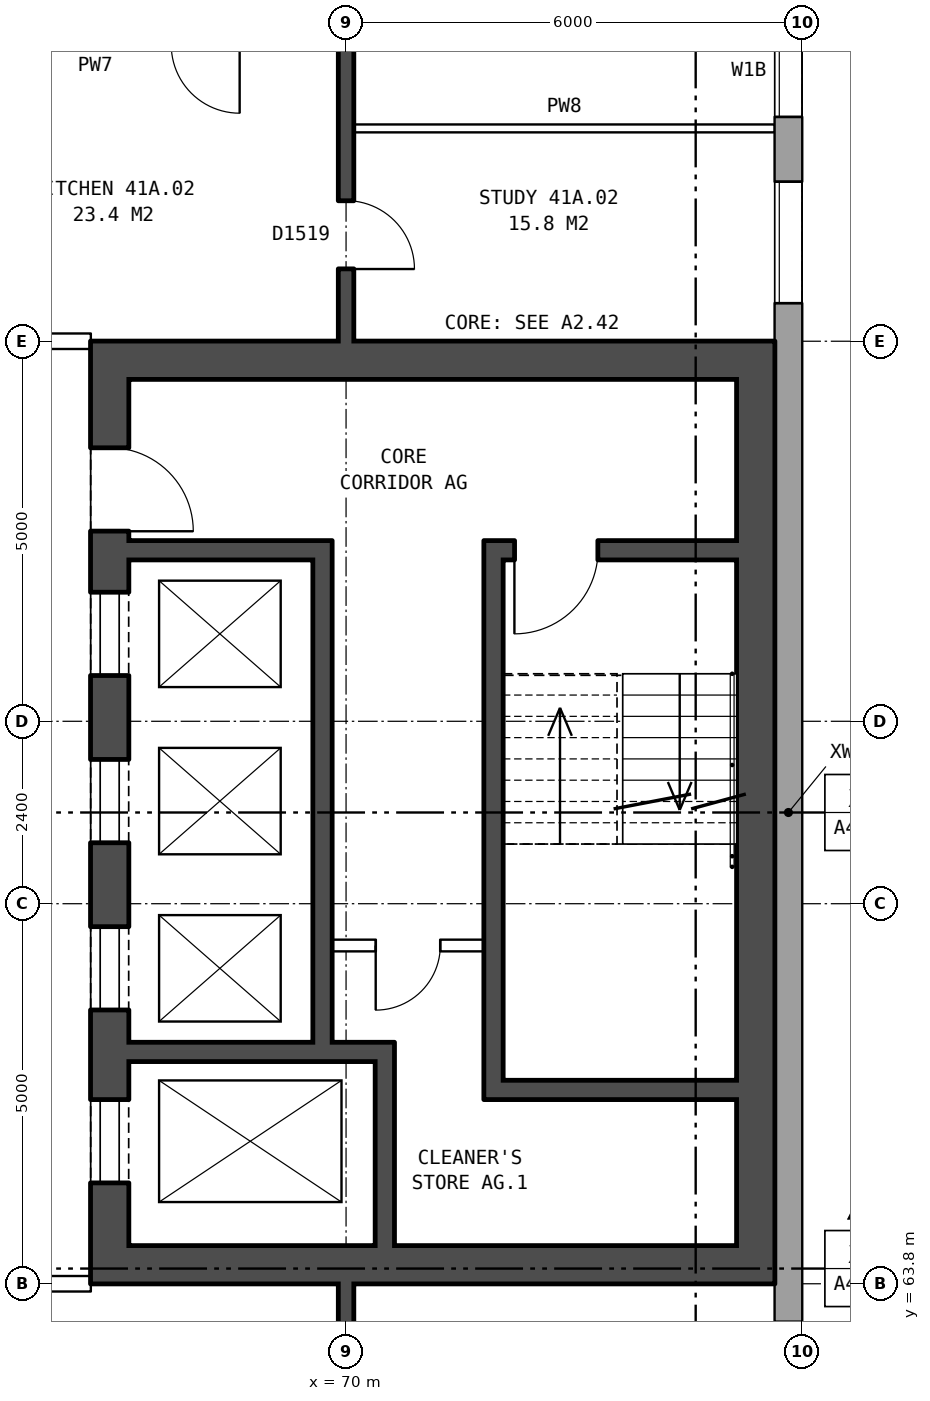
"""IFC4 building model, lengths in metres.
Left out: names, types, materials, properties, quantities, classifications, styles, units other than length and angle.
Written with IfcOpenShell. Run it as: python <this file> out.ifc"""

import sys

from ifc_helpers import new_model, si_unit, direction, frame, frame_2d, origin, place, context, subcontext, project, spatial, rectangle, extrude, element, fill, save


model = new_model("IFC4")
c1 = context("Model", 3, precision=1e-05, world=origin(), true_north=direction((0.0, 1.0)))
c2 = subcontext(c1, "Body", "Model", "MODEL_VIEW")
j1 = project(units=[si_unit("LENGTHUNIT", "METRE"), si_unit("PLANEANGLEUNIT", "RADIAN")], contexts=[c1])
p1 = place(None, origin())
s1 = spatial("IfcSite", under=j1, at=p1, CompositionType="ELEMENT")
p2 = place(p1, origin())
s2 = spatial("IfcBuilding", under=s1, at=p2, CompositionType="ELEMENT")
p3 = place(p2, frame((0.0, 0.0, 148.5)))
s3 = spatial("IfcBuildingStorey", under=s2, at=p3, CompositionType="ELEMENT", Elevation=148.5)
p4 = place(p3, frame((75.82, 57.075, 0.0), z_axis=(0.0, 0.0, 1.0), x_axis=(0.0, 1.0, 0.0)))
e1 = element("IfcWall", 1, at=p4, inside=s3, PredefinedType="STANDARD", context=c2, shape_type="SweptSolid", body=[
    extrude(rectangle(XDim=25.851, YDim=0.36, at=frame_2d((12.925, 0.0))), origin(), (0.0, 0.0, 1.0), 2.85),
])
p5 = place(p4, frame((1.375, 0.0, 0.8)))
e2 = element("IfcOpeningElement", 2, at=p5, cuts=e1, PredefinedType="OPENING", context=c2, shape_type="SweptSolid", body=[
    extrude(rectangle(XDim=1.0, YDim=1.2, at=frame_2d((0.5, 0.6))), frame((0.0, 0.19, 0.0), z_axis=(0.0, -1.0, 0.0), x_axis=(1.0, 0.0, 0.0)), (0.0, 0.0, 1.0), 0.38),
])
p6 = place(p4, frame((4.625, 0.0, 0.8)))
e3 = element("IfcOpeningElement", 3, at=p6, cuts=e1, PredefinedType="OPENING", context=c2, shape_type="SweptSolid", body=[
    extrude(rectangle(XDim=1.6, YDim=1.8, at=frame_2d((0.8, 0.9))), frame((0.0, 0.19, 0.0), z_axis=(0.0, -1.0, 0.0), x_axis=(1.0, 0.0, 0.0)), (0.0, 0.0, 1.0), 0.38),
])
p7 = place(p4, frame((19.625, 0.0, 0.8)))
e4 = element("IfcOpeningElement", 4, at=p7, cuts=e1, PredefinedType="OPENING", context=c2, shape_type="SweptSolid", body=[
    extrude(rectangle(XDim=1.6, YDim=1.8, at=frame_2d((0.8, 0.9))), frame((0.0, 0.19, 0.0), z_axis=(0.0, -1.0, 0.0), x_axis=(1.0, 0.0, 0.0)), (0.0, 0.0, 1.0), 0.38),
])
p8 = place(p4, frame((22.075, 0.0, 0.8)))
e5 = element("IfcOpeningElement", 5, at=p8, cuts=e1, PredefinedType="OPENING", context=c2, shape_type="SweptSolid", body=[
    extrude(rectangle(XDim=1.2, YDim=1.8, at=frame_2d((0.6, 0.9))), frame((0.0, 0.19, 0.0), z_axis=(0.0, -1.0, 0.0), x_axis=(1.0, 0.0, 0.0)), (0.0, 0.0, 1.0), 0.38),
])
p9 = place(p4, frame((2.675, 0.0, 0.8)))
e6 = element("IfcOpeningElement", 6, at=p9, cuts=e1, PredefinedType="OPENING", context=c2, shape_type="SweptSolid", body=[
    extrude(rectangle(XDim=1.4, YDim=1.8, at=frame_2d((0.7, 0.9))), frame((0.0, 0.19, 0.0), z_axis=(0.0, -1.0, 0.0), x_axis=(1.0, 0.0, 0.0)), (0.0, 0.0, 1.0), 0.38),
])
p10 = place(p4, frame((23.575, 0.0, 0.8)))
e7 = element("IfcOpeningElement", 7, at=p10, cuts=e1, PredefinedType="OPENING", context=c2, shape_type="SweptSolid", body=[
    extrude(rectangle(XDim=1.4, YDim=0.9, at=frame_2d((0.7, 0.45))), frame((0.0, 0.19, 0.0), z_axis=(0.0, -1.0, 0.0), x_axis=(1.0, 0.0, 0.0)), (0.0, 0.0, 1.0), 0.38),
])
p11 = place(p3, frame((66.89, 63.8, 0.0), z_axis=(0.0, 0.0, 1.0), x_axis=(0.0, 1.0, 0.0)))
e8 = element("IfcWall", 8, at=p11, inside=s3, PredefinedType="SHEAR", context=c2, shape_type="SweptSolid", body=[
    extrude(rectangle(XDim=12.4, YDim=0.5, at=frame_2d((6.2, 0.0))), origin(), (0.0, 0.0, 1.0), 2.85),
])
p12 = place(p11, frame((1.325, 0.0, 0.0)))
e9 = element("IfcOpeningElement", 9, at=p12, cuts=e8, PredefinedType="OPENING", context=c2, shape_type="SweptSolid", body=[
    extrude(rectangle(XDim=1.1, YDim=2.1, at=frame_2d((0.55, 1.05))), frame((0.0, 0.26, 0.0), z_axis=(0.0, -1.0, 0.0), x_axis=(1.0, 0.0, 0.0)), (0.0, 0.0, 1.0), 0.52),
])
p13 = place(p11, frame((3.6, 0.0, 0.0)))
e10 = element("IfcOpeningElement", 10, at=p13, cuts=e8, PredefinedType="OPENING", context=c2, shape_type="SweptSolid", body=[
    extrude(rectangle(XDim=1.1, YDim=2.1, at=frame_2d((0.55, 1.05))), frame((0.0, 0.26, 0.0), z_axis=(0.0, -1.0, 0.0), x_axis=(1.0, 0.0, 0.0)), (0.0, 0.0, 1.0), 0.52),
])
p14 = place(p11, frame((5.8, 0.0, 0.0)))
e11 = element("IfcOpeningElement", 11, at=p14, cuts=e8, PredefinedType="OPENING", context=c2, shape_type="SweptSolid", body=[
    extrude(rectangle(XDim=1.1, YDim=2.1, at=frame_2d((0.55, 1.05))), frame((0.0, 0.26, 0.0), z_axis=(0.0, -1.0, 0.0), x_axis=(1.0, 0.0, 0.0)), (0.0, 0.0, 1.0), 0.52),
])
p15 = place(p11, frame((8.0, 0.0, 0.0)))
e12 = element("IfcOpeningElement", 12, at=p15, cuts=e8, PredefinedType="OPENING", context=c2, shape_type="SweptSolid", body=[
    extrude(rectangle(XDim=1.1, YDim=2.1, at=frame_2d((0.55, 1.05))), frame((0.0, 0.26, 0.0), z_axis=(0.0, -1.0, 0.0), x_axis=(1.0, 0.0, 0.0)), (0.0, 0.0, 1.0), 0.52),
])
p16 = place(p11, frame((9.9, 0.0, 0.0)))
e13 = element("IfcOpeningElement", 13, at=p16, cuts=e8, PredefinedType="OPENING", context=c2, shape_type="SweptSolid", body=[
    extrude(rectangle(XDim=1.1, YDim=2.1, at=frame_2d((0.55, 1.05))), frame((0.0, 0.26, 0.0), z_axis=(0.0, -1.0, 0.0), x_axis=(1.0, 0.0, 0.0)), (0.0, 0.0, 1.0), 0.52),
])
p17 = place(p3, frame((75.39, 63.8, 0.0), z_axis=(0.0, 0.0, 1.0), x_axis=(0.0, 1.0, 0.0)))
e14 = element("IfcWall", 14, at=p17, inside=s3, PredefinedType="SHEAR", context=c2, shape_type="SweptSolid", body=[
    extrude(rectangle(XDim=12.4, YDim=0.5, at=frame_2d((6.2, 0.0))), origin(), (0.0, 0.0, 1.0), 2.85),
])
for number, where, z_axis, x_axis in (
    (15, (67.14, 64.05, 0.0), (0.0, 0.0, 1.0), (1.0, 0.0, 0.0)),
    (16, (67.14, 75.95, 0.0), (0.0, 0.0, 1.0), (1.0, 0.0, 0.0)),
):
    element("IfcWall", number, at=place(p3, frame(where, z_axis=z_axis, x_axis=x_axis)), inside=s3, PredefinedType="SHEAR", context=c2, shape_type="SweptSolid", body=[
        extrude(rectangle(XDim=8.0, YDim=0.5, at=frame_2d((4.0, 0.0))), origin(), (0.0, 0.0, 1.0), 2.85),
    ])
p18 = place(p3, frame((72.065, 66.35, 0.0), z_axis=(0.0, 0.0, 1.0), x_axis=(1.0, 0.0, 0.0)))
e17 = element("IfcWall", 17, at=p18, inside=s3, PredefinedType="SHEAR", context=c2, shape_type="SweptSolid", body=[
    extrude(rectangle(XDim=3.075, YDim=0.25, at=frame_2d((1.538, 0.0))), origin(), (0.0, 0.0, 1.0), 2.85),
])
p19 = place(p3, frame((67.14, 66.85, 0.0), z_axis=(0.0, 0.0, 1.0), x_axis=(1.0, 0.0, 0.0)))
e18 = element("IfcWall", 18, at=p19, inside=s3, PredefinedType="SHEAR", context=c2, shape_type="SweptSolid", body=[
    extrude(rectangle(XDim=3.495, YDim=0.25, at=frame_2d((1.748, 0.0))), origin(), (0.0, 0.0, 1.0), 2.85),
])
p20 = place(p3, frame((69.815, 68.25, 0.0), z_axis=(0.0, 0.0, 1.0), x_axis=(1.0, 0.0, 0.0)))
e19 = element("IfcWall", 19, at=p20, inside=s3, PredefinedType="PARTITIONING", context=c2, shape_type="SweptSolid", body=[
    extrude(rectangle(XDim=2.0, YDim=0.15, at=frame_2d((1.0, 0.0))), origin(), (0.0, 0.0, 1.0), 2.85),
])
p21 = place(p20, frame((0.575, 0.0, 0.0)))
e20 = element("IfcOpeningElement", 20, at=p21, cuts=e19, PredefinedType="OPENING", context=c2, shape_type="SweptSolid", body=[
    extrude(rectangle(XDim=0.85, YDim=2.1, at=frame_2d((0.425, 1.05))), frame((0.0, 0.085, 0.0), z_axis=(0.0, -1.0, 0.0), x_axis=(1.0, 0.0, 0.0)), (0.0, 0.0, 1.0), 0.17),
])
p22 = place(p3, frame((67.14, 73.45, 0.0), z_axis=(0.0, 0.0, 1.0), x_axis=(1.0, 0.0, 0.0)))
e21 = element("IfcWall", 21, at=p22, inside=s3, PredefinedType="SHEAR", context=c2, shape_type="SweptSolid", body=[
    extrude(rectangle(XDim=2.425, YDim=0.25, at=frame_2d((1.212, 0.0))), origin(), (0.0, 0.0, 1.0), 2.85),
])
p23 = place(p3, frame((72.065, 73.45, 0.0), z_axis=(0.0, 0.0, 1.0), x_axis=(1.0, 0.0, 0.0)))
e22 = element("IfcWall", 22, at=p23, inside=s3, PredefinedType="SHEAR", context=c2, shape_type="SweptSolid", body=[
    extrude(rectangle(XDim=3.075, YDim=0.25, at=frame_2d((1.538, 0.0))), origin(), (0.0, 0.0, 1.0), 2.85),
])
p24 = place(p23, frame((0.15, 0.0, 0.0)))
e23 = element("IfcOpeningElement", 23, at=p24, cuts=e22, PredefinedType="OPENING", context=c2, shape_type="SweptSolid", body=[
    extrude(rectangle(XDim=1.1, YDim=2.1, at=frame_2d((0.55, 1.05))), frame((0.0, 0.135, 0.0), z_axis=(0.0, -1.0, 0.0), x_axis=(1.0, 0.0, 0.0)), (0.0, 0.0, 1.0), 0.27),
])
p25 = place(p3, frame((69.69, 66.975, 0.0), z_axis=(0.0, 0.0, 1.0), x_axis=(0.0, 1.0, 0.0)))
e24 = element("IfcWall", 24, at=p25, inside=s3, PredefinedType="SHEAR", context=c2, shape_type="SweptSolid", body=[
    extrude(rectangle(XDim=6.6, YDim=0.25, at=frame_2d((3.3, 0.0))), origin(), (0.0, 0.0, 1.0), 2.85),
])
p26 = place(p3, frame((70.51, 64.3, 0.0), z_axis=(0.0, 0.0, 1.0), x_axis=(0.0, 1.0, 0.0)))
e25 = element("IfcWall", 25, at=p26, inside=s3, PredefinedType="SHEAR", context=c2, shape_type="SweptSolid", body=[
    extrude(rectangle(XDim=2.425, YDim=0.25, at=frame_2d((1.212, 0.0))), origin(), (0.0, 0.0, 1.0), 2.85),
])
p27 = place(p3, frame((71.94, 66.225, 0.0), z_axis=(0.0, 0.0, 1.0), x_axis=(0.0, 1.0, 0.0)))
e26 = element("IfcWall", 26, at=p27, inside=s3, PredefinedType="SHEAR", context=c2, shape_type="SweptSolid", body=[
    extrude(rectangle(XDim=7.35, YDim=0.25, at=frame_2d((3.675, 0.0))), origin(), (0.0, 0.0, 1.0), 2.85),
])
p28 = place(p3, frame((63.64, 63.8, 0.0), z_axis=(0.0, 0.0, 1.0), x_axis=(1.0, 0.0, 0.0)))
e27 = element("IfcWall", 27, at=p28, inside=s3, PredefinedType="PARTITIONING", context=c2, shape_type="SweptSolid", body=[
    extrude(rectangle(XDim=3.0, YDim=0.2, at=frame_2d((1.5, 0.0))), origin(), (0.0, 0.0, 1.0), 2.85),
])
p29 = place(p28, frame((1.18, 0.0, 0.0)))
e28 = element("IfcOpeningElement", 28, at=p29, cuts=e27, PredefinedType="OPENING", context=c2, shape_type="SweptSolid", body=[
    extrude(rectangle(XDim=1.0, YDim=2.1, at=frame_2d((0.5, 1.05))), frame((0.0, 0.11, 0.0), z_axis=(0.0, -1.0, 0.0), x_axis=(1.0, 0.0, 0.0)), (0.0, 0.0, 1.0), 0.22),
])
p30 = place(p3, frame((63.64, 76.2, 0.0), z_axis=(0.0, 0.0, 1.0), x_axis=(1.0, 0.0, 0.0)))
e29 = element("IfcWall", 29, at=p30, inside=s3, PredefinedType="PARTITIONING", context=c2, shape_type="SweptSolid", body=[
    extrude(rectangle(XDim=3.0, YDim=0.2, at=frame_2d((1.5, 0.0))), origin(), (0.0, 0.0, 1.0), 2.85),
])
p31 = place(p30, frame((1.18, 0.0, 0.0)))
e30 = element("IfcOpeningElement", 30, at=p31, cuts=e29, PredefinedType="OPENING", context=c2, shape_type="SweptSolid", body=[
    extrude(rectangle(XDim=1.0, YDim=2.1, at=frame_2d((0.5, 1.05))), frame((0.0, 0.11, 0.0), z_axis=(0.0, -1.0, 0.0), x_axis=(1.0, 0.0, 0.0)), (0.0, 0.0, 1.0), 0.22),
])
p32 = place(p3, frame((70.1, 79.0, 0.0), z_axis=(0.0, 0.0, 1.0), x_axis=(1.0, 0.0, 0.0)))
e31 = element("IfcWall", 31, at=p32, inside=s3, PredefinedType="PARTITIONING", context=c2, shape_type="SweptSolid", body=[
    extrude(rectangle(XDim=5.54, YDim=0.1, at=frame_2d((2.77, 0.0))), origin(), (0.0, 0.0, 1.0), 2.85),
])
p33 = place(p3, frame((70.0, 54.36, 0.0), z_axis=(0.0, 0.0, 1.0), x_axis=(0.0, 1.0, 0.0)))
e32 = element("IfcWall", 32, at=p33, inside=s3, PredefinedType="SOLIDWALL", context=c2, shape_type="SweptSolid", body=[
    extrude(rectangle(XDim=9.44, YDim=0.2, at=frame_2d((4.72, 0.0))), origin(), (0.0, 0.0, 1.0), 2.85),
])
p34 = place(p33, frame((7.04, 0.0, 0.0)))
e33 = element("IfcOpeningElement", 33, at=p34, cuts=e32, PredefinedType="OPENING", context=c2, shape_type="SweptSolid", body=[
    extrude(rectangle(XDim=0.9, YDim=2.1, at=frame_2d((0.45, 1.05))), frame((0.0, 0.11, 0.0), z_axis=(0.0, -1.0, 0.0), x_axis=(1.0, 0.0, 0.0)), (0.0, 0.0, 1.0), 0.22),
])
p35 = place(p3, frame((70.0, 76.2, 0.0), z_axis=(0.0, 0.0, 1.0), x_axis=(0.0, 1.0, 0.0)))
e34 = element("IfcWall", 34, at=p35, inside=s3, PredefinedType="SOLIDWALL", context=c2, shape_type="SweptSolid", body=[
    extrude(rectangle(XDim=9.44, YDim=0.2, at=frame_2d((4.72, 0.0))), origin(), (0.0, 0.0, 1.0), 2.85),
])
p36 = place(p35, frame((6.22, 0.0, 0.0)))
e35 = element("IfcOpeningElement", 35, at=p36, cuts=e34, PredefinedType="OPENING", context=c2, shape_type="SweptSolid", body=[
    extrude(rectangle(XDim=0.9, YDim=2.1, at=frame_2d((0.45, 1.05))), frame((0.0, 0.11, 0.0), z_axis=(0.0, -1.0, 0.0), x_axis=(1.0, 0.0, 0.0)), (0.0, 0.0, 1.0), 0.22),
])
p37 = place(p35, frame((0.95, 0.0, 0.0)))
e36 = element("IfcOpeningElement", 36, at=p37, cuts=e34, PredefinedType="OPENING", context=c2, shape_type="SweptSolid", body=[
    extrude(rectangle(XDim=0.9, YDim=2.1, at=frame_2d((0.45, 1.05))), frame((0.0, 0.11, 0.0), z_axis=(0.0, -1.0, 0.0), x_axis=(1.0, 0.0, 0.0)), (0.0, 0.0, 1.0), 0.22),
])
p38 = place(p6, origin())
e37 = element("IfcWindow", 37, at=p38, inside=s3, PartitioningType="SINGLE_PANEL", PredefinedType="WINDOW", context=c2, shape_type="SweptSolid", body=[
    extrude(rectangle(XDim=1.6, YDim=1.8, at=frame_2d((0.8, 0.9))), frame((0.0, 0.15, 0.0), z_axis=(0.0, -1.0, 0.0), x_axis=(1.0, 0.0, 0.0)), (0.0, 0.0, 1.0), 0.06),
])
fill(e3, e37)
p39 = place(p7, origin())
e38 = element("IfcWindow", 38, at=p39, inside=s3, PartitioningType="SINGLE_PANEL", PredefinedType="WINDOW", context=c2, shape_type="SweptSolid", body=[
    extrude(rectangle(XDim=1.6, YDim=1.8, at=frame_2d((0.8, 0.9))), frame((0.0, 0.15, 0.0), z_axis=(0.0, -1.0, 0.0), x_axis=(1.0, 0.0, 0.0)), (0.0, 0.0, 1.0), 0.06),
])
fill(e4, e38)
p40 = place(p8, origin())
e39 = element("IfcWindow", 39, at=p40, inside=s3, PartitioningType="SINGLE_PANEL", PredefinedType="WINDOW", context=c2, shape_type="SweptSolid", body=[
    extrude(rectangle(XDim=1.2, YDim=1.8, at=frame_2d((0.6, 0.9))), frame((0.0, 0.15, 0.0), z_axis=(0.0, -1.0, 0.0), x_axis=(1.0, 0.0, 0.0)), (0.0, 0.0, 1.0), 0.06),
])
fill(e5, e39)
p41 = place(p12, origin())
e40 = element("IfcDoor", 40, at=p41, inside=s3, OperationType="DOUBLE_DOOR_SLIDING", PredefinedType="DOOR", context=c2, shape_type="SweptSolid", body=[
    extrude(rectangle(XDim=1.1, YDim=2.1, at=frame_2d((0.55, 1.05))), frame((0.0, -0.185, 0.0), z_axis=(0.0, -1.0, 0.0), x_axis=(1.0, 0.0, 0.0)), (0.0, 0.0, 1.0), 0.05),
])
fill(e9, e40)
p42 = place(p13, origin())
e41 = element("IfcDoor", 41, at=p42, inside=s3, OperationType="DOUBLE_DOOR_SLIDING", PredefinedType="DOOR", context=c2, shape_type="SweptSolid", body=[
    extrude(rectangle(XDim=1.1, YDim=2.1, at=frame_2d((0.55, 1.05))), frame((0.0, -0.185, 0.0), z_axis=(0.0, -1.0, 0.0), x_axis=(1.0, 0.0, 0.0)), (0.0, 0.0, 1.0), 0.05),
])
fill(e10, e41)
p43 = place(p14, origin())
e42 = element("IfcDoor", 42, at=p43, inside=s3, OperationType="DOUBLE_DOOR_SLIDING", PredefinedType="DOOR", context=c2, shape_type="SweptSolid", body=[
    extrude(rectangle(XDim=1.1, YDim=2.1, at=frame_2d((0.55, 1.05))), frame((0.0, -0.185, 0.0), z_axis=(0.0, -1.0, 0.0), x_axis=(1.0, 0.0, 0.0)), (0.0, 0.0, 1.0), 0.05),
])
fill(e11, e42)
p44 = place(p15, origin())
e43 = element("IfcDoor", 43, at=p44, inside=s3, OperationType="DOUBLE_DOOR_SLIDING", PredefinedType="DOOR", context=c2, shape_type="SweptSolid", body=[
    extrude(rectangle(XDim=1.1, YDim=2.1, at=frame_2d((0.55, 1.05))), frame((0.0, -0.185, 0.0), z_axis=(0.0, -1.0, 0.0), x_axis=(1.0, 0.0, 0.0)), (0.0, 0.0, 1.0), 0.05),
])
fill(e12, e43)
p45 = place(p16, frame((1.1, 0.0, 0.0), z_axis=(0.0, 0.0, 1.0), x_axis=(-1.0, 0.0, 0.0)))
e44 = element("IfcDoor", 44, at=p45, inside=s3, OperationType="SINGLE_SWING_RIGHT", PredefinedType="DOOR", context=c2, shape_type="SweptSolid", body=[
    extrude(rectangle(XDim=1.1, YDim=2.1, at=frame_2d((0.55, 1.05))), frame((0.0, 0.235, 0.0), z_axis=(0.0, -1.0, 0.0), x_axis=(1.0, 0.0, 0.0)), (0.0, 0.0, 1.0), 0.05),
])
fill(e13, e44)
p46 = place(p24, frame((1.1, 0.0, 0.0), z_axis=(0.0, 0.0, 1.0), x_axis=(-1.0, 0.0, 0.0)))
e45 = element("IfcDoor", 45, at=p46, inside=s3, OperationType="SINGLE_SWING_RIGHT", PredefinedType="DOOR", context=c2, shape_type="SweptSolid", body=[
    extrude(rectangle(XDim=1.1, YDim=2.1, at=frame_2d((0.55, 1.05))), frame((0.0, 0.025, 0.0), z_axis=(0.0, -1.0, 0.0), x_axis=(1.0, 0.0, 0.0)), (0.0, 0.0, 1.0), 0.05),
])
fill(e23, e45)
p47 = place(p21, frame((0.85, 0.0, 0.0), z_axis=(0.0, 0.0, 1.0), x_axis=(-1.0, 0.0, 0.0)))
e46 = element("IfcDoor", 46, at=p47, inside=s3, OperationType="SINGLE_SWING_RIGHT", PredefinedType="DOOR", context=c2, shape_type="SweptSolid", body=[
    extrude(rectangle(XDim=0.85, YDim=2.1, at=frame_2d((0.425, 1.05))), frame((0.0, 0.025, 0.0), z_axis=(0.0, -1.0, 0.0), x_axis=(1.0, 0.0, 0.0)), (0.0, 0.0, 1.0), 0.05),
])
fill(e20, e46)
p48 = place(p37, frame((0.9, 0.0, 0.0), z_axis=(0.0, 0.0, 1.0), x_axis=(-1.0, 0.0, 0.0)))
e47 = element("IfcDoor", 47, at=p48, inside=s3, OperationType="SINGLE_SWING_RIGHT", PredefinedType="DOOR", context=c2, shape_type="SweptSolid", body=[
    extrude(rectangle(XDim=0.9, YDim=2.1, at=frame_2d((0.45, 1.05))), frame((0.0, 0.025, 0.0), z_axis=(0.0, -1.0, 0.0), x_axis=(1.0, 0.0, 0.0)), (0.0, 0.0, 1.0), 0.05),
])
fill(e36, e47)
save(model, sys.argv[1])
